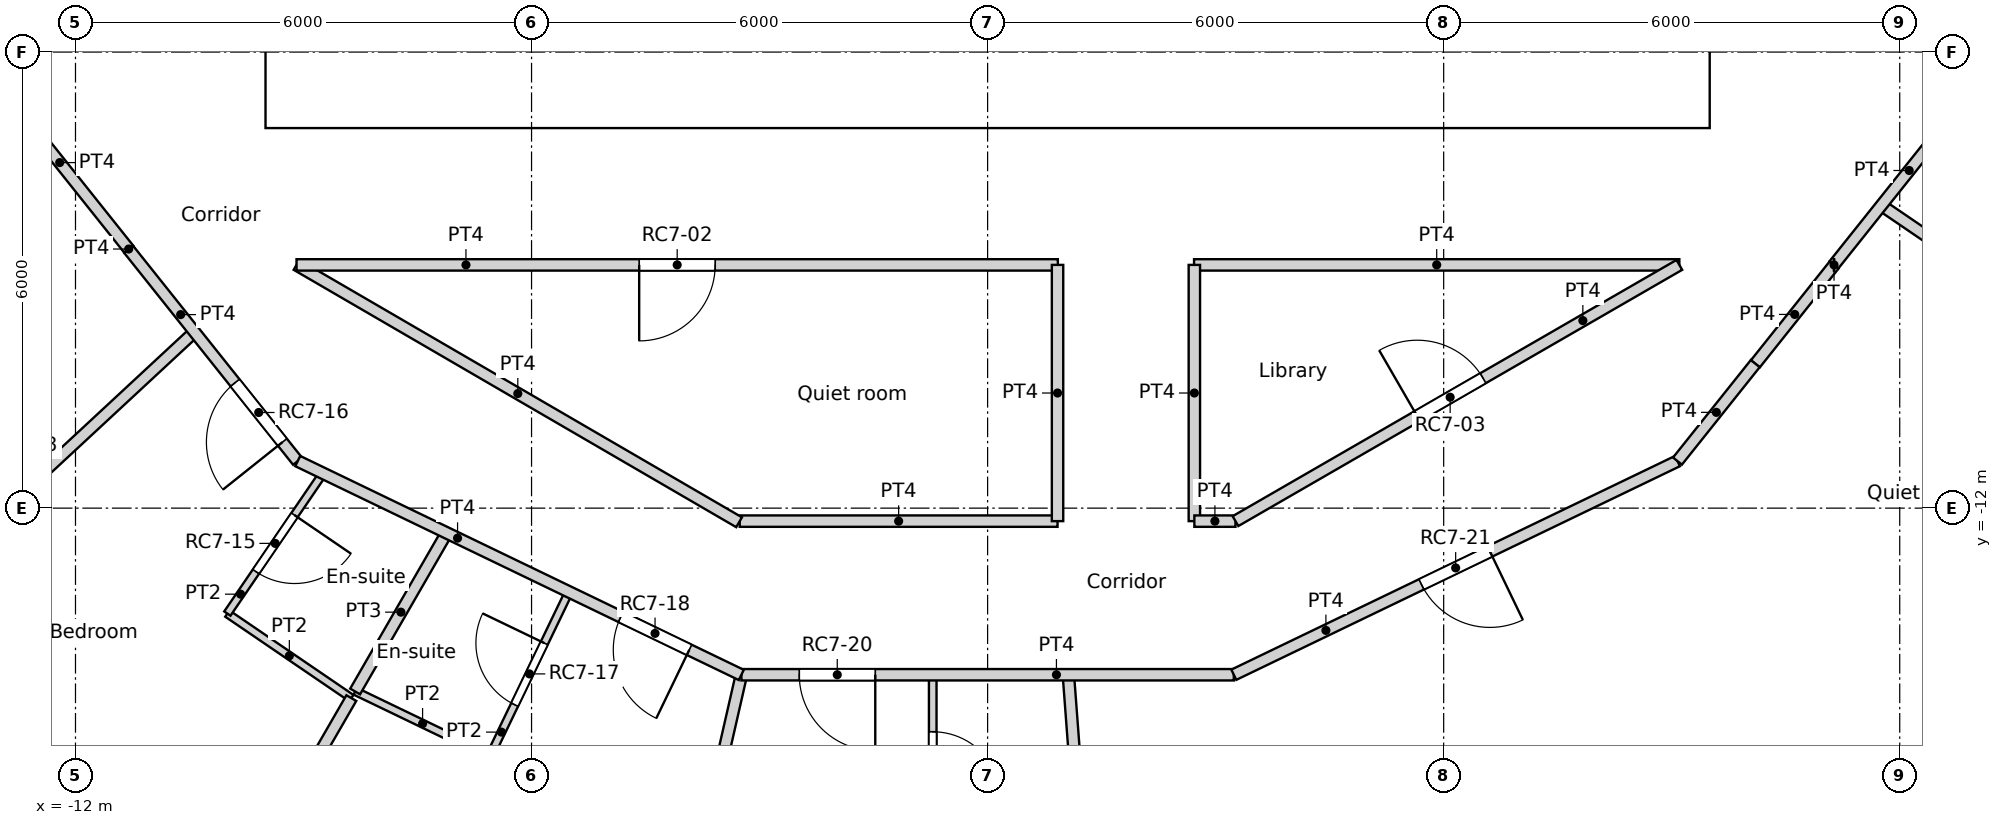
"""IFC4 building model, lengths in metres.
Left out: names, types, materials, properties, quantities, classifications, styles, units other than length and angle.
Written with IfcOpenShell. Run it as: python <this file> out.ifc"""

import sys

from ifc_helpers import new_model, si_unit, direction, frame, frame_2d, origin, origin_2d, place, context, subcontext, project, spatial, rectangle, circle, extrude, element, fill, save


model = new_model("IFC4")
c1 = context("Model", 3, precision=1e-05, world=origin(), true_north=direction((0.0, 1.0)))
c2 = subcontext(c1, "Body", "Model", "MODEL_VIEW")
j1 = project(units=[si_unit("LENGTHUNIT", "METRE"), si_unit("PLANEANGLEUNIT", "RADIAN")], contexts=[c1])
p1 = place(None, origin())
s1 = spatial("IfcSite", under=j1, at=p1, CompositionType="ELEMENT")
p2 = place(p1, origin())
s2 = spatial("IfcBuilding", under=s1, at=p2, CompositionType="ELEMENT")
p3 = place(p2, frame((0.0, 0.0, 294.6)))
s3 = spatial("IfcBuildingStorey", under=s2, at=p3, CompositionType="ELEMENT", Elevation=294.6)
p4 = place(p3, frame((11.735, -14.716, 0.0), z_axis=(0.0, 0.0, 1.0), x_axis=(1.0, 0.0, 0.0)))
e1 = element("IfcColumn", 1, at=p4, inside=s3, PredefinedType="COLUMN", context=c2, shape_type="SweptSolid", body=[
    extrude(circle(Radius=0.45, at=origin_2d()), origin(), (0.0, 0.0, 1.0), 3.6),
])
p5 = place(p3, frame((-9.5, -6.7, 0.0), z_axis=(0.0, 0.0, 1.0), x_axis=(1.0, 0.0, 0.0)))
e2 = element("IfcWall", 2, at=p5, inside=s3, PredefinedType="SOLIDWALL", context=c2, shape_type="SweptSolid", body=[
    extrude(rectangle(XDim=19.0, YDim=0.6, at=frame_2d((9.5, 0.0))), origin(), (0.0, 0.0, 1.0), 3.6),
])
p6 = place(p5, frame((10.4, 0.0, 0.0)))
e3 = element("IfcOpeningElement", 3, at=p6, cuts=e2, PredefinedType="OPENING", context=c2, shape_type="SweptSolid", body=[
    extrude(rectangle(XDim=1.0, YDim=2.1, at=frame_2d((0.5, 1.05))), frame((0.0, 0.3, 0.0), z_axis=(0.0, -1.0, 0.0), x_axis=(1.0, 0.0, 0.0)), (0.0, 0.0, 1.0), 0.6),
])
p7 = place(p5, frame((5.35, 0.0, 0.0)))
e4 = element("IfcOpeningElement", 4, at=p7, cuts=e2, PredefinedType="OPENING", context=c2, shape_type="SweptSolid", body=[
    extrude(rectangle(XDim=1.7, YDim=2.1, at=frame_2d((0.85, 1.05))), frame((0.0, 0.3, 0.0), z_axis=(0.0, -1.0, 0.0), x_axis=(1.0, 0.0, 0.0)), (0.0, 0.0, 1.0), 0.6),
])
p8 = place(p5, frame((11.95, 0.0, 0.0)))
e5 = element("IfcOpeningElement", 5, at=p8, cuts=e2, PredefinedType="OPENING", context=c2, shape_type="SweptSolid", body=[
    extrude(rectangle(XDim=1.7, YDim=2.1, at=frame_2d((0.85, 1.05))), frame((0.0, 0.3, 0.0), z_axis=(0.0, -1.0, 0.0), x_axis=(1.0, 0.0, 0.0)), (0.0, 0.0, 1.0), 0.6),
])
p9 = place(p3, frame((-9.2, -6.4, 0.0), z_axis=(0.0, 0.0, 1.0), x_axis=(0.0, 1.0, 0.0)))
e6 = element("IfcWall", 6, at=p9, inside=s3, PredefinedType="SOLIDWALL", context=c2, shape_type="SweptSolid", body=[
    extrude(rectangle(XDim=12.8, YDim=0.6, at=frame_2d((6.4, 0.0))), origin(), (0.0, 0.0, 1.0), 3.6),
])
p10 = place(p3, frame((9.2, -6.4, 0.0), z_axis=(0.0, 0.0, 1.0), x_axis=(0.0, 1.0, 0.0)))
e7 = element("IfcWall", 7, at=p10, inside=s3, PredefinedType="SOLIDWALL", context=c2, shape_type="SweptSolid", body=[
    extrude(rectangle(XDim=12.8, YDim=0.6, at=frame_2d((6.4, 0.0))), origin(), (0.0, 0.0, 1.0), 3.6),
])
p11 = place(p10, frame((6.4, 0.0, 0.0)))
e8 = element("IfcOpeningElement", 8, at=p11, cuts=e7, PredefinedType="OPENING", context=c2, shape_type="SweptSolid", body=[
    extrude(rectangle(XDim=1.8, YDim=2.1, at=frame_2d((0.9, 1.05))), frame((0.0, 0.3, 0.0), z_axis=(0.0, -1.0, 0.0), x_axis=(1.0, 0.0, 0.0)), (0.0, 0.0, 1.0), 0.6),
])
for number, where, z_axis, x_axis in (
    (9, (-2.25, -6.4, 0.0), (0.0, 0.0, 1.0), (0.0, 1.0, 0.0)),
    (10, (0.55, -6.4, 0.0), (0.0, 0.0, 1.0), (0.0, 1.0, 0.0)),
    (11, (2.25, -6.4, 0.0), (0.0, 0.0, 1.0), (0.0, 1.0, 0.0)),
):
    element("IfcWall", number, at=place(p3, frame(where, z_axis=z_axis, x_axis=x_axis)), inside=s3, PredefinedType="SOLIDWALL", context=c2, shape_type="SweptSolid", body=[
        extrude(rectangle(XDim=3.15, YDim=0.3, at=frame_2d((1.575, 0.0))), origin(), (0.0, 0.0, 1.0), 3.25),
    ])
p12 = place(p3, frame((-9.092, -8.8, 0.0), z_axis=(0.0, 0.0, 1.0), x_axis=(1.0, 0.0, 0.0)))
e12 = element("IfcWall", 12, at=p12, inside=s3, PredefinedType="PARTITIONING", context=c2, shape_type="SweptSolid", body=[
    extrude(rectangle(XDim=10.016, YDim=0.15, at=frame_2d((5.008, 0.0))), origin(), (0.0, 0.0, 1.0), 3.25),
])
p13 = place(p12, frame((4.508, 0.0, 0.0)))
e13 = element("IfcOpeningElement", 13, at=p13, cuts=e12, PredefinedType="OPENING", context=c2, shape_type="SweptSolid", body=[
    extrude(rectangle(XDim=1.0, YDim=2.04, at=frame_2d((0.5, 1.02))), frame((0.0, 0.075, 0.0), z_axis=(0.0, -1.0, 0.0), x_axis=(1.0, 0.0, 0.0)), (0.0, 0.0, 1.0), 0.15),
])
p14 = place(p3, frame((-9.092, -8.8, 0.0), z_axis=(0.0, 0.0, 1.0), x_axis=(0.864470922103, -0.502682827277, 0.0)))
e14 = element("IfcWall", 14, at=p14, inside=s3, PredefinedType="PARTITIONING", context=c2, shape_type="SweptSolid", body=[
    extrude(rectangle(XDim=6.735, YDim=0.15, at=frame_2d((3.368, 0.0))), origin(), (0.0, 0.0, 1.0), 3.25),
])
p15 = place(p3, frame((2.716, -8.8, 0.0), z_axis=(0.0, 0.0, 1.0), x_axis=(1.0, 0.0, 0.0)))
e15 = element("IfcWall", 15, at=p15, inside=s3, PredefinedType="PARTITIONING", context=c2, shape_type="SweptSolid", body=[
    extrude(rectangle(XDim=6.385, YDim=0.15, at=frame_2d((3.192, 0.0))), origin(), (0.0, 0.0, 1.0), 3.25),
])
p16 = place(p3, frame((-11.3, -8.596, 0.0), z_axis=(0.0, 0.0, 1.0), x_axis=(0.623390921228, -0.781910326911, 0.0)))
e16 = element("IfcWall", 16, at=p16, inside=s3, PredefinedType="PARTITIONING", context=c2, shape_type="SweptSolid", body=[
    extrude(rectangle(XDim=3.564, YDim=0.15, at=frame_2d((1.782, 0.0))), origin(), (0.0, 0.0, 1.0), 3.25),
])
p17 = place(p16, frame((2.244, 0.0, 0.0)))
e17 = element("IfcOpeningElement", 17, at=p17, cuts=e16, PredefinedType="OPENING", context=c2, shape_type="SweptSolid", body=[
    extrude(rectangle(XDim=1.0, YDim=2.1, at=frame_2d((0.5, 1.05))), frame((0.0, 0.075, 0.0), z_axis=(0.0, -1.0, 0.0), x_axis=(1.0, 0.0, 0.0)), (0.0, 0.0, 1.0), 0.15),
])
p18 = place(p3, frame((-11.3, -8.596, 0.0), z_axis=(0.0, 0.0, 1.0), x_axis=(0.0, 1.0, 0.0)))
e18 = element("IfcWall", 18, at=p18, inside=s3, PredefinedType="PARTITIONING", context=c2, shape_type="SweptSolid", body=[
    extrude(rectangle(XDim=0.01, YDim=0.15, at=frame_2d((0.005, 0.0))), origin(), (0.0, 0.0, 1.0), 3.25),
])
p19 = place(p3, frame((11.137, -8.8, 0.0), z_axis=(0.0, 0.0, 1.0), x_axis=(-1.0, 0.0, 0.0)))
e19 = element("IfcWall", 19, at=p19, inside=s3, PredefinedType="PARTITIONING", context=c2, shape_type="SweptSolid", body=[
    extrude(rectangle(XDim=0.003, YDim=0.15, at=frame_2d((0.001, 0.0))), origin(), (0.0, 0.0, 1.0), 3.25),
])
p20 = place(p3, frame((10.101, -10.101, 0.0), z_axis=(0.0, 0.0, 1.0), x_axis=(0.623098344652, 0.782143498913, 0.0)))
e20 = element("IfcWall", 20, at=p20, inside=s3, PredefinedType="PARTITIONING", context=c2, shape_type="SweptSolid", body=[
    extrude(rectangle(XDim=1.661, YDim=0.15, at=frame_2d((0.831, 0.0))), origin(), (0.0, 0.0, 1.0), 3.25),
])
p21 = place(p3, frame((11.134, -8.8, 0.0), z_axis=(0.0, 0.0, 1.0), x_axis=(0.623560523309, 0.781775078761, 0.0)))
e21 = element("IfcWall", 21, at=p21, inside=s3, PredefinedType="PARTITIONING", context=c2, shape_type="SweptSolid", body=[
    extrude(rectangle(XDim=3.177, YDim=0.15, at=frame_2d((1.589, 0.0))), origin(), (0.0, 0.0, 1.0), 3.25),
])
p22 = place(p3, frame((-13.115, -6.316, 0.0), z_axis=(0.0, 0.0, 1.0), x_axis=(0.623446514299, -0.781866001185, 0.0)))
e22 = element("IfcWall", 22, at=p22, inside=s3, PredefinedType="PARTITIONING", context=c2, shape_type="SweptSolid", body=[
    extrude(rectangle(XDim=2.911, YDim=0.15, at=frame_2d((1.456, 0.0))), origin(), (0.0, 0.0, 1.0), 3.25),
])
p23 = place(p3, frame((-3.261, -12.171, 0.0), z_axis=(0.0, 0.0, 1.0), x_axis=(1.0, 0.0, 0.0)))
e23 = element("IfcWall", 23, at=p23, inside=s3, PredefinedType="PARTITIONING", context=c2, shape_type="SweptSolid", body=[
    extrude(rectangle(XDim=4.181, YDim=0.15, at=frame_2d((2.09, 0.0))), origin(), (0.0, 0.0, 1.0), 3.25),
])
for number, where, z_axis, x_axis in (
    (24, (0.92, -12.171, 0.0), (0.0, 0.0, 1.0), (0.0, 1.0, 0.0)),
    (25, (2.72, -12.171, 0.0), (0.0, 0.0, 1.0), (0.0, 1.0, 0.0)),
):
    element("IfcWall", number, at=place(p3, frame(where, z_axis=z_axis, x_axis=x_axis)), inside=s3, PredefinedType="PARTITIONING", context=c2, shape_type="SweptSolid", body=[
        extrude(rectangle(XDim=3.371, YDim=0.15, at=frame_2d((1.686, 0.0))), origin(), (0.0, 0.0, 1.0), 3.25),
    ])
p24 = place(p3, frame((2.72, -12.171, 0.0), z_axis=(0.0, 0.0, 1.0), x_axis=(1.0, 0.0, 0.0)))
e26 = element("IfcWall", 26, at=p24, inside=s3, PredefinedType="PARTITIONING", context=c2, shape_type="SweptSolid", body=[
    extrude(rectangle(XDim=0.541, YDim=0.15, at=frame_2d((0.271, 0.0))), origin(), (0.0, 0.0, 1.0), 3.25),
])
p25 = place(p3, frame((3.261, -12.171, 0.0), z_axis=(0.0, 0.0, 1.0), x_axis=(0.866066809554, 0.499928276245, 0.0)))
e27 = element("IfcWall", 27, at=p25, inside=s3, PredefinedType="PARTITIONING", context=c2, shape_type="SweptSolid", body=[
    extrude(rectangle(XDim=6.743, YDim=0.15, at=frame_2d((3.371, 0.0))), origin(), (0.0, 0.0, 1.0), 3.25),
])
p26 = place(p25, frame((2.761, 0.0, 0.0)))
e28 = element("IfcOpeningElement", 28, at=p26, cuts=e27, PredefinedType="OPENING", context=c2, shape_type="SweptSolid", body=[
    extrude(rectangle(XDim=1.0, YDim=2.04, at=frame_2d((0.5, 1.02))), frame((0.0, 0.075, 0.0), z_axis=(0.0, -1.0, 0.0), x_axis=(1.0, 0.0, 0.0)), (0.0, 0.0, 1.0), 0.15),
])
p27 = place(p3, frame((-9.076, -11.381, 0.0), z_axis=(0.0, 0.0, 1.0), x_axis=(0.900778421649, -0.434278983018, 0.0)))
e29 = element("IfcWall", 29, at=p27, inside=s3, PredefinedType="PARTITIONING", context=c2, shape_type="SweptSolid", body=[
    extrude(rectangle(XDim=6.479, YDim=0.15, at=frame_2d((3.239, 0.0))), origin(), (0.0, 0.0, 1.0), 3.25),
])
p28 = place(p27, frame((4.719, 0.0, 0.0)))
e30 = element("IfcOpeningElement", 30, at=p28, cuts=e29, PredefinedType="OPENING", context=c2, shape_type="SweptSolid", body=[
    extrude(rectangle(XDim=1.0, YDim=2.1, at=frame_2d((0.5, 1.05))), frame((0.0, 0.075, 0.0), z_axis=(0.0, -1.0, 0.0), x_axis=(1.0, 0.0, 0.0)), (0.0, 0.0, 1.0), 0.15),
])
p29 = place(p3, frame((-3.239, -14.192, 0.0), z_axis=(0.0, 0.0, 1.0), x_axis=(1.0, 0.0, 0.0)))
e31 = element("IfcWall", 31, at=p29, inside=s3, PredefinedType="PARTITIONING", context=c2, shape_type="SweptSolid", body=[
    extrude(rectangle(XDim=6.478, YDim=0.15, at=frame_2d((3.239, 0.0))), origin(), (0.0, 0.0, 1.0), 3.25),
])
p30 = place(p29, frame((0.761, 0.0, 0.0)))
e32 = element("IfcOpeningElement", 32, at=p30, cuts=e31, PredefinedType="OPENING", context=c2, shape_type="SweptSolid", body=[
    extrude(rectangle(XDim=1.0, YDim=2.1, at=frame_2d((0.5, 1.05))), frame((0.0, 0.075, 0.0), z_axis=(0.0, -1.0, 0.0), x_axis=(1.0, 0.0, 0.0)), (0.0, 0.0, 1.0), 0.15),
])
p31 = place(p3, frame((9.076, -11.381, 0.0), z_axis=(0.0, 0.0, 1.0), x_axis=(0.623805208652, 0.781579849829, 0.0)))
e33 = element("IfcWall", 33, at=p31, inside=s3, PredefinedType="PARTITIONING", context=c2, shape_type="SweptSolid", body=[
    extrude(rectangle(XDim=1.64, YDim=0.15, at=frame_2d((0.82, 0.0))), origin(), (0.0, 0.0, 1.0), 3.25),
])
p32 = place(p3, frame((3.239, -14.192, 0.0), z_axis=(0.0, 0.0, 1.0), x_axis=(0.900976027191, 0.433868872388, 0.0)))
e34 = element("IfcWall", 34, at=p32, inside=s3, PredefinedType="PARTITIONING", context=c2, shape_type="SweptSolid", body=[
    extrude(rectangle(XDim=6.479, YDim=0.15, at=frame_2d((3.239, 0.0))), origin(), (0.0, 0.0, 1.0), 3.25),
])
p33 = place(p32, frame((2.74, 0.0, 0.0)))
e35 = element("IfcOpeningElement", 35, at=p33, cuts=e34, PredefinedType="OPENING", context=c2, shape_type="SweptSolid", body=[
    extrude(rectangle(XDim=1.0, YDim=2.04, at=frame_2d((0.5, 1.02))), frame((0.0, 0.075, 0.0), z_axis=(0.0, -1.0, 0.0), x_axis=(1.0, 0.0, 0.0)), (0.0, 0.0, 1.0), 0.15),
])
p34 = place(p3, frame((-14.493, -13.448, 0.0), z_axis=(0.0, 0.0, 1.0), x_axis=(0.73295202722, 0.68028032883, 0.0)))
e36 = element("IfcWall", 36, at=p34, inside=s3, PredefinedType="PARTITIONING", context=c2, shape_type="SweptSolid", body=[
    extrude(rectangle(XDim=5.539, YDim=0.15, at=frame_2d((2.77, 0.0))), origin(), (0.0, 0.0, 1.0), 3.25),
])
p35 = place(p3, frame((-10.002, -13.387, 0.0), z_axis=(0.0, 0.0, 1.0), x_axis=(0.563469042551, 0.826137178734, 0.0)))
e37 = element("IfcWall", 37, at=p35, inside=s3, PredefinedType="PARTITIONING", context=c2, shape_type="SweptSolid", body=[
    extrude(rectangle(XDim=2.234, YDim=0.1, at=frame_2d((1.117, 0.0))), origin(), (0.0, 0.0, 1.0), 3.25),
])
p36 = place(p35, frame((0.667, 0.0, 0.0)))
e38 = element("IfcOpeningElement", 38, at=p36, cuts=e37, PredefinedType="OPENING", context=c2, shape_type="SweptSolid", body=[
    extrude(rectangle(XDim=0.9, YDim=2.04, at=frame_2d((0.45, 1.02))), frame((0.0, 0.05, 0.0), z_axis=(0.0, -1.0, 0.0), x_axis=(1.0, 0.0, 0.0)), (0.0, 0.0, 1.0), 0.1),
])
p37 = place(p3, frame((-10.002, -13.387, 0.0), z_axis=(0.0, 0.0, 1.0), x_axis=(0.82620117489, -0.563375202339, 0.0)))
e39 = element("IfcWall", 39, at=p37, inside=s3, PredefinedType="PARTITIONING", context=c2, shape_type="SweptSolid", body=[
    extrude(rectangle(XDim=1.974, YDim=0.1, at=frame_2d((0.987, 0.0))), origin(), (0.0, 0.0, 1.0), 3.25),
])
p38 = place(p3, frame((-9.886, -17.122, 0.0), z_axis=(0.0, 0.0, 1.0), x_axis=(0.500117793536, 0.865957384972, 0.0)))
e40 = element("IfcWall", 40, at=p38, inside=s3, PredefinedType="PARTITIONING", context=c2, shape_type="SweptSolid", body=[
    extrude(rectangle(XDim=3.029, YDim=0.15, at=frame_2d((1.515, 0.0))), origin(), (0.0, 0.0, 1.0), 3.25),
])
p39 = place(p3, frame((-8.321, -14.412, 0.0), z_axis=(0.0, 0.0, 1.0), x_axis=(0.500017667814, 0.866015203027, 0.0)))
e41 = element("IfcWall", 41, at=p39, inside=s3, PredefinedType="PARTITIONING", context=c2, shape_type="SweptSolid", body=[
    extrude(rectangle(XDim=2.41, YDim=0.15, at=frame_2d((1.205, 0.0))), origin(), (0.0, 0.0, 1.0), 3.25),
])
p40 = place(p3, frame((-8.319, -14.409, 0.0), z_axis=(0.0, 0.0, 1.0), x_axis=(0.900936932599, -0.433950047216, 0.0)))
e42 = element("IfcWall", 42, at=p40, inside=s3, PredefinedType="PARTITIONING", context=c2, shape_type="SweptSolid", body=[
    extrude(rectangle(XDim=1.966, YDim=0.1, at=frame_2d((0.983, 0.0))), origin(), (0.0, 0.0, 1.0), 3.25),
])
p41 = place(p3, frame((-6.548, -15.262, 0.0), z_axis=(0.0, 0.0, 1.0), x_axis=(0.433855388624, 0.900982520231, 0.0)))
e43 = element("IfcWall", 43, at=p41, inside=s3, PredefinedType="PARTITIONING", context=c2, shape_type="SweptSolid", body=[
    extrude(rectangle(XDim=2.399, YDim=0.1, at=frame_2d((1.2, 0.0))), origin(), (0.0, 0.0, 1.0), 3.25),
])
p42 = place(p41, frame((0.75, 0.0, 0.0)))
e44 = element("IfcOpeningElement", 44, at=p42, cuts=e43, PredefinedType="OPENING", context=c2, shape_type="SweptSolid", body=[
    extrude(rectangle(XDim=0.9, YDim=2.04, at=frame_2d((0.45, 1.02))), frame((0.0, 0.05, 0.0), z_axis=(0.0, -1.0, 0.0), x_axis=(1.0, 0.0, 0.0)), (0.0, 0.0, 1.0), 0.1),
])
p43 = place(p3, frame((-4.4, -19.276, 0.0), z_axis=(0.0, 0.0, 1.0), x_axis=(0.222612505682, 0.974907007008, 0.0)))
e45 = element("IfcWall", 45, at=p43, inside=s3, PredefinedType="PARTITIONING", context=c2, shape_type="SweptSolid", body=[
    extrude(rectangle(XDim=5.215, YDim=0.15, at=frame_2d((2.607, 0.0))), origin(), (0.0, 0.0, 1.0), 3.25),
])
p44 = place(p3, frame((-0.722, -16.592, 0.0), z_axis=(0.0, 0.0, 1.0), x_axis=(0.0, 1.0, 0.0)))
e46 = element("IfcWall", 46, at=p44, inside=s3, PredefinedType="PARTITIONING", context=c2, shape_type="SweptSolid", body=[
    extrude(rectangle(XDim=2.4, YDim=0.1, at=frame_2d((1.2, 0.0))), origin(), (0.0, 0.0, 1.0), 3.25),
])
p45 = place(p44, frame((0.75, 0.0, 0.0)))
e47 = element("IfcOpeningElement", 47, at=p45, cuts=e46, PredefinedType="OPENING", context=c2, shape_type="SweptSolid", body=[
    extrude(rectangle(XDim=0.9, YDim=2.04, at=frame_2d((0.45, 1.02))), frame((0.0, 0.05, 0.0), z_axis=(0.0, -1.0, 0.0), x_axis=(1.0, 0.0, 0.0)), (0.0, 0.0, 1.0), 0.1),
])
for number, where, z_axis, x_axis in (
    (48, (1.062, -14.192, 0.0), (0.0, 0.0, 1.0), (0.075, -0.997, 0.0)),
    (49, (11.759, -8.017, 0.0), (0.0, 0.0, 1.0), (0.826, -0.563, 0.0)),
):
    element("IfcWall", number, at=place(p3, frame(where, z_axis=z_axis, x_axis=x_axis)), inside=s3, PredefinedType="PARTITIONING", context=c2, shape_type="SweptSolid", body=[
        extrude(rectangle(XDim=5.54, YDim=0.15, at=frame_2d((2.77, 0.0))), origin(), (0.0, 0.0, 1.0), 3.25),
    ])
p46 = place(p6, origin())
e50 = element("IfcDoor", 50, at=p46, inside=s3, OperationType="SINGLE_SWING_LEFT", PredefinedType="DOOR", context=c2, shape_type="SweptSolid", body=[
    extrude(rectangle(XDim=1.0, YDim=2.1, at=frame_2d((0.5, 1.05))), frame((0.0, 0.025, 0.0), z_axis=(0.0, -1.0, 0.0), x_axis=(1.0, 0.0, 0.0)), (0.0, 0.0, 1.0), 0.05),
])
fill(e3, e50)
p47 = place(p7, origin())
e51 = element("IfcDoor", 51, at=p47, inside=s3, OperationType="DOUBLE_DOOR_SINGLE_SWING", PredefinedType="DOOR", context=c2, shape_type="SweptSolid", body=[
    extrude(rectangle(XDim=1.7, YDim=2.1, at=frame_2d((0.85, 1.05))), frame((0.0, 0.025, 0.0), z_axis=(0.0, -1.0, 0.0), x_axis=(1.0, 0.0, 0.0)), (0.0, 0.0, 1.0), 0.05),
])
fill(e4, e51)
p48 = place(p8, origin())
e52 = element("IfcDoor", 52, at=p48, inside=s3, OperationType="DOUBLE_DOOR_SINGLE_SWING", PredefinedType="DOOR", context=c2, shape_type="SweptSolid", body=[
    extrude(rectangle(XDim=1.7, YDim=2.1, at=frame_2d((0.85, 1.05))), frame((0.0, 0.025, 0.0), z_axis=(0.0, -1.0, 0.0), x_axis=(1.0, 0.0, 0.0)), (0.0, 0.0, 1.0), 0.05),
])
fill(e5, e52)
p49 = place(p13, origin())
e53 = element("IfcDoor", 53, at=p49, inside=s3, OperationType="SINGLE_SWING_RIGHT", PredefinedType="DOOR", context=c2, shape_type="SweptSolid", body=[
    extrude(rectangle(XDim=1.0, YDim=2.04, at=frame_2d((0.5, 1.02))), frame((0.0, 0.025, 0.0), z_axis=(0.0, -1.0, 0.0), x_axis=(1.0, 0.0, 0.0)), (0.0, 0.0, 1.0), 0.05),
])
fill(e13, e53)
p50 = place(p26, origin())
e54 = element("IfcDoor", 54, at=p50, inside=s3, OperationType="SINGLE_SWING_LEFT", PredefinedType="DOOR", context=c2, shape_type="SweptSolid", body=[
    extrude(rectangle(XDim=1.0, YDim=2.04, at=frame_2d((0.5, 1.02))), frame((0.0, 0.025, 0.0), z_axis=(0.0, -1.0, 0.0), x_axis=(1.0, 0.0, 0.0)), (0.0, 0.0, 1.0), 0.05),
])
fill(e28, e54)
p51 = place(p36, origin())
e55 = element("IfcDoor", 55, at=p51, inside=s3, OperationType="SINGLE_SWING_LEFT", PredefinedType="DOOR", context=c2, shape_type="SweptSolid", body=[
    extrude(rectangle(XDim=0.9, YDim=2.04, at=frame_2d((0.45, 1.02))), frame((0.0, 0.025, 0.0), z_axis=(0.0, -1.0, 0.0), x_axis=(1.0, 0.0, 0.0)), (0.0, 0.0, 1.0), 0.05),
])
fill(e38, e55)
p52 = place(p17, origin())
e56 = element("IfcDoor", 56, at=p52, inside=s3, OperationType="SINGLE_SWING_LEFT", PredefinedType="DOOR", context=c2, shape_type="SweptSolid", body=[
    extrude(rectangle(XDim=1.0, YDim=2.1, at=frame_2d((0.5, 1.05))), frame((0.0, 0.025, 0.0), z_axis=(0.0, -1.0, 0.0), x_axis=(1.0, 0.0, 0.0)), (0.0, 0.0, 1.0), 0.05),
])
fill(e17, e56)
p53 = place(p42, origin())
e57 = element("IfcDoor", 57, at=p53, inside=s3, OperationType="SINGLE_SWING_RIGHT", PredefinedType="DOOR", context=c2, shape_type="SweptSolid", body=[
    extrude(rectangle(XDim=0.9, YDim=2.04, at=frame_2d((0.45, 1.02))), frame((0.0, 0.025, 0.0), z_axis=(0.0, -1.0, 0.0), x_axis=(1.0, 0.0, 0.0)), (0.0, 0.0, 1.0), 0.05),
])
fill(e44, e57)
p54 = place(p28, origin())
e58 = element("IfcDoor", 58, at=p54, inside=s3, OperationType="SINGLE_SWING_LEFT", PredefinedType="DOOR", context=c2, shape_type="SweptSolid", body=[
    extrude(rectangle(XDim=1.0, YDim=2.1, at=frame_2d((0.5, 1.05))), frame((0.0, 0.025, 0.0), z_axis=(0.0, -1.0, 0.0), x_axis=(1.0, 0.0, 0.0)), (0.0, 0.0, 1.0), 0.05),
])
fill(e30, e58)
p55 = place(p45, origin())
e59 = element("IfcDoor", 59, at=p55, inside=s3, OperationType="SINGLE_SWING_RIGHT", PredefinedType="DOOR", context=c2, shape_type="SweptSolid", body=[
    extrude(rectangle(XDim=0.9, YDim=2.04, at=frame_2d((0.45, 1.02))), frame((0.0, 0.025, 0.0), z_axis=(0.0, -1.0, 0.0), x_axis=(1.0, 0.0, 0.0)), (0.0, 0.0, 1.0), 0.05),
])
fill(e47, e59)
p56 = place(p30, origin())
e60 = element("IfcDoor", 60, at=p56, inside=s3, OperationType="SINGLE_SWING_LEFT", PredefinedType="DOOR", context=c2, shape_type="SweptSolid", body=[
    extrude(rectangle(XDim=1.0, YDim=2.1, at=frame_2d((0.5, 1.05))), frame((0.0, 0.025, 0.0), z_axis=(0.0, -1.0, 0.0), x_axis=(1.0, 0.0, 0.0)), (0.0, 0.0, 1.0), 0.05),
])
fill(e32, e60)
p57 = place(p33, origin())
e61 = element("IfcDoor", 61, at=p57, inside=s3, OperationType="SINGLE_SWING_LEFT", PredefinedType="DOOR", context=c2, shape_type="SweptSolid", body=[
    extrude(rectangle(XDim=1.0, YDim=2.04, at=frame_2d((0.5, 1.02))), frame((0.0, 0.025, 0.0), z_axis=(0.0, -1.0, 0.0), x_axis=(1.0, 0.0, 0.0)), (0.0, 0.0, 1.0), 0.05),
])
fill(e35, e61)
save(model, sys.argv[1])
